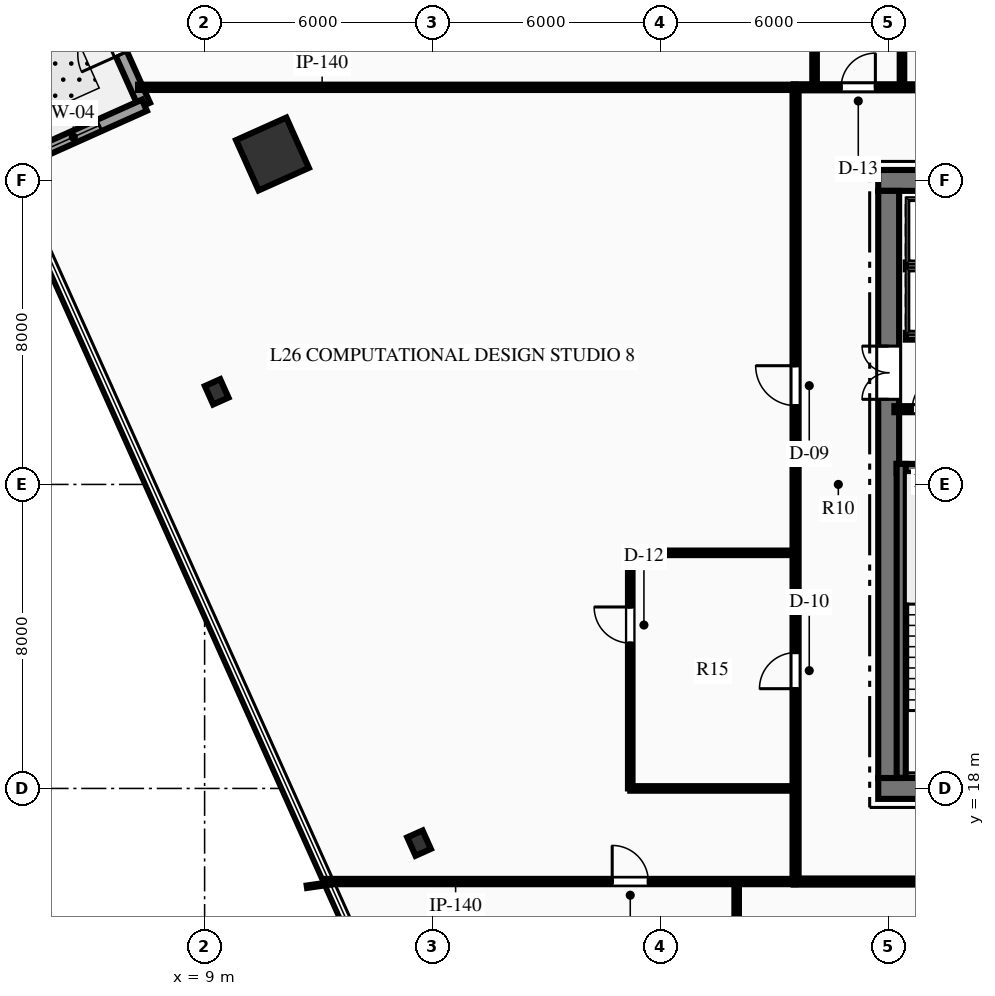
"""IFC4 building model, lengths in metres.
Left out: names, types, materials, properties, quantities, classifications, styles, units other than length and angle.
Written with IfcOpenShell. Run it as: python <this file> out.ifc"""

import sys

from ifc_helpers import new_model, si_unit, direction, frame, frame_2d, origin, origin_2d, place, context, subcontext, project, spatial, rectangle, hollow_rectangle, i_section, extrude, element, fill, save


model = new_model("IFC4")
c1 = context("Model", 3, precision=1e-05, world=origin(), true_north=direction((0.0, 1.0)))
c2 = subcontext(c1, "Body", "Model", "MODEL_VIEW")
j1 = project(units=[si_unit("LENGTHUNIT", "METRE"), si_unit("PLANEANGLEUNIT", "RADIAN")], contexts=[c1])
p1 = place(None, origin())
s1 = spatial("IfcSite", under=j1, at=p1, CompositionType="ELEMENT")
p2 = place(p1, origin())
s2 = spatial("IfcBuilding", under=s1, at=p2, CompositionType="ELEMENT")
p3 = place(p2, frame((0.0, 0.0, 109.2)))
s3 = spatial("IfcBuildingStorey", under=s2, at=p3, CompositionType="ELEMENT", Elevation=109.2)
p4 = place(p3, frame((26.725, 18.0, 0.0), z_axis=(0.0, 0.0, 1.0), x_axis=(1.0, 0.0, 0.0)))
e1 = element("IfcWall", 1, at=p4, inside=s3, PredefinedType="SHEAR", context=c2, shape_type="SweptSolid", body=[
    extrude(rectangle(XDim=18.55, YDim=0.55, at=frame_2d((9.275, 0.0))), origin(), (0.0, 0.0, 1.0), 3.75),
])
p5 = place(p4, frame((7.375, 0.0, 0.0)))
e2 = element("IfcOpeningElement", 2, at=p5, cuts=e1, PredefinedType="OPENING", context=c2, shape_type="SweptSolid", body=[
    extrude(rectangle(XDim=1.1, YDim=2.15, at=frame_2d((0.55, 1.075))), frame((0.0, 0.285, 0.0), z_axis=(0.0, -1.0, 0.0), x_axis=(1.0, 0.0, 0.0)), (0.0, 0.0, 1.0), 0.57),
])
p6 = place(p4, frame((10.075, 0.0, 0.0)))
e3 = element("IfcOpeningElement", 3, at=p6, cuts=e1, PredefinedType="OPENING", context=c2, shape_type="SweptSolid", body=[
    extrude(rectangle(XDim=1.1, YDim=2.15, at=frame_2d((0.55, 1.075))), frame((0.0, 0.285, 0.0), z_axis=(0.0, -1.0, 0.0), x_axis=(1.0, 0.0, 0.0)), (0.0, 0.0, 1.0), 0.57),
])
p7 = place(p3, frame((26.725, 34.0, 0.0), z_axis=(0.0, 0.0, 1.0), x_axis=(1.0, 0.0, 0.0)))
e4 = element("IfcWall", 4, at=p7, inside=s3, PredefinedType="SHEAR", context=c2, shape_type="SweptSolid", body=[
    extrude(rectangle(XDim=18.55, YDim=0.55, at=frame_2d((9.275, 0.0))), origin(), (0.0, 0.0, 1.0), 3.75),
])
p8 = place(p7, frame((1.24, 0.0, 0.0)))
e5 = element("IfcOpeningElement", 5, at=p8, cuts=e4, PredefinedType="OPENING", context=c2, shape_type="SweptSolid", body=[
    extrude(rectangle(XDim=1.1, YDim=2.15, at=frame_2d((0.55, 1.075))), frame((0.0, 0.285, 0.0), z_axis=(0.0, -1.0, 0.0), x_axis=(1.0, 0.0, 0.0)), (0.0, 0.0, 1.0), 0.57),
])
p9 = place(p7, frame((3.49, 0.0, 0.0)))
e6 = element("IfcOpeningElement", 6, at=p9, cuts=e4, PredefinedType="OPENING", context=c2, shape_type="SweptSolid", body=[
    extrude(rectangle(XDim=1.1, YDim=2.15, at=frame_2d((0.55, 1.075))), frame((0.0, 0.285, 0.0), z_axis=(0.0, -1.0, 0.0), x_axis=(1.0, 0.0, 0.0)), (0.0, 0.0, 1.0), 0.57),
])
p10 = place(p7, frame((13.96, 0.0, 0.0)))
e7 = element("IfcOpeningElement", 7, at=p10, cuts=e4, PredefinedType="OPENING", context=c2, shape_type="SweptSolid", body=[
    extrude(rectangle(XDim=1.1, YDim=2.15, at=frame_2d((0.55, 1.075))), frame((0.0, 0.285, 0.0), z_axis=(0.0, -1.0, 0.0), x_axis=(1.0, 0.0, 0.0)), (0.0, 0.0, 1.0), 0.57),
])
p11 = place(p7, frame((16.21, 0.0, 0.0)))
e8 = element("IfcOpeningElement", 8, at=p11, cuts=e4, PredefinedType="OPENING", context=c2, shape_type="SweptSolid", body=[
    extrude(rectangle(XDim=1.1, YDim=2.15, at=frame_2d((0.55, 1.075))), frame((0.0, 0.285, 0.0), z_axis=(0.0, -1.0, 0.0), x_axis=(1.0, 0.0, 0.0)), (0.0, 0.0, 1.0), 0.57),
])
p12 = place(p3, frame((27.0, 18.275, 0.0), z_axis=(0.0, 0.0, 1.0), x_axis=(0.0, 1.0, 0.0)))
e9 = element("IfcWall", 9, at=p12, inside=s3, PredefinedType="SHEAR", context=c2, shape_type="SweptSolid", body=[
    extrude(rectangle(XDim=15.45, YDim=0.55, at=frame_2d((7.725, 0.0))), origin(), (0.0, 0.0, 1.0), 3.75),
])
p13 = place(p12, frame((9.965, 0.0, 0.0)))
e10 = element("IfcOpeningElement", 10, at=p13, cuts=e9, PredefinedType="OPENING", context=c2, shape_type="SweptSolid", body=[
    extrude(rectangle(XDim=1.4, YDim=2.2, at=frame_2d((0.7, 1.1))), frame((0.0, 0.285, 0.0), z_axis=(0.0, -1.0, 0.0), x_axis=(1.0, 0.0, 0.0)), (0.0, 0.0, 1.0), 0.57),
])
p14 = place(p3, frame((27.21, 26.42, 0.0), z_axis=(0.0, 0.0, 1.0), x_axis=(1.0, 0.0, 0.0)))
e11 = element("IfcWall", 11, at=p14, inside=s3, PredefinedType="SHEAR", context=c2, shape_type="SweptSolid", body=[
    extrude(rectangle(XDim=3.98, YDim=0.24, at=frame_2d((1.99, 0.0))), origin(), (0.0, 0.0, 1.0), 3.75),
])
p15 = place(p3, frame((27.33, 18.28, 0.0), z_axis=(0.0, 0.0, 1.0), x_axis=(0.0, 1.0, 0.0)))
e12 = element("IfcWall", 12, at=p15, inside=s3, PredefinedType="SHEAR", context=c2, shape_type="SweptSolid", body=[
    extrude(rectangle(XDim=8.26, YDim=0.24, at=frame_2d((4.13, 0.0))), origin(), (0.0, 0.0, 1.0), 3.75),
])
p16 = place(p3, frame((10.786, 34.695, 0.0), z_axis=(0.0, 0.0, 1.0), x_axis=(0.912477494148, 0.409126902895, 0.0)))
e13 = element("IfcColumn", 13, at=p16, inside=s3, PredefinedType="COLUMN", context=c2, shape_type="SweptSolid", body=[
    extrude(hollow_rectangle(XDim=1.45, YDim=1.45, WallThickness=0.07, at=origin_2d()), origin(), (0.0, 0.0, 1.0), 3.75),
])
for number, where, z_axis, x_axis in (
    (14, (9.318, 28.437, 0.0), (0.0, 0.0, 1.0), (0.912, 0.409, 0.0)),
    (15, (14.643, 16.561, 0.0), (0.0, 0.0, 1.0), (0.912, 0.409, 0.0)),
):
    element("IfcColumn", number, at=place(p3, frame(where, z_axis=z_axis, x_axis=x_axis)), inside=s3, PredefinedType="COLUMN", context=c2, shape_type="SweptSolid", body=[
        extrude(i_section(OverallWidth=0.442, OverallDepth=0.531, WebThickness=0.066, FlangeThickness=0.106, at=origin_2d()), origin(), (0.0, 0.0, 1.0), 3.75),
    ])
p17 = place(p3, frame((7.416, 35.979, 0.0), z_axis=(0.0, 0.0, 1.0), x_axis=(-0.409136259283, 0.912473298974, 0.0)))
e16 = element("IfcWall", 16, at=p17, inside=s3, PredefinedType="STANDARD", context=c2, shape_type="SweptSolid", body=[
    extrude(rectangle(XDim=4.1, YDim=0.32, at=frame_2d((2.05, 0.0))), origin(), (0.0, 0.0, 1.0), 3.45),
])
p18 = place(p17, frame((1.475, 0.0, 0.0)))
e17 = element("IfcOpeningElement", 17, at=p18, cuts=e16, PredefinedType="OPENING", context=c2, shape_type="SweptSolid", body=[
    extrude(rectangle(XDim=1.15, YDim=2.2, at=frame_2d((0.575, 1.1))), frame((0.0, 0.17, 0.0), z_axis=(0.0, -1.0, 0.0), x_axis=(1.0, 0.0, 0.0)), (0.0, 0.0, 1.0), 0.34),
])
p19 = place(p3, frame((3.675, 34.301, 0.0), z_axis=(0.0, 0.0, 1.0), x_axis=(0.912473298974, 0.409136259283, 0.0)))
e18 = element("IfcWall", 18, at=p19, inside=s3, PredefinedType="STANDARD", context=c2, shape_type="SweptSolid", body=[
    extrude(rectangle(XDim=4.1, YDim=0.32, at=frame_2d((2.05, 0.0))), origin(), (0.0, 0.0, 1.0), 3.45),
])
p20 = place(p19, frame((1.3, 0.0, 0.85)))
e19 = element("IfcOpeningElement", 19, at=p20, cuts=e18, PredefinedType="OPENING", context=c2, shape_type="SweptSolid", body=[
    extrude(rectangle(XDim=1.5, YDim=2.1, at=frame_2d((0.75, 1.05))), frame((0.0, 0.17, 0.0), z_axis=(0.0, -1.0, 0.0), x_axis=(1.0, 0.0, 0.0)), (0.0, 0.0, 1.0), 0.34),
])
p21 = place(p3, frame((27.15, 27.98, 0.0), z_axis=(0.0, 0.0, 1.0), x_axis=(1.0, 0.0, 0.0)))
e20 = element("IfcWall", 20, at=p21, inside=s3, PredefinedType="PARTITIONING", context=c2, shape_type="SweptSolid", body=[
    extrude(rectangle(XDim=4.05, YDim=0.16, at=frame_2d((2.025, 0.0))), origin(), (0.0, 0.0, 1.0), 3.45),
])
p22 = place(p21, frame((0.47, 0.0, 0.0)))
e21 = element("IfcOpeningElement", 21, at=p22, cuts=e20, PredefinedType="OPENING", context=c2, shape_type="SweptSolid", body=[
    extrude(rectangle(XDim=0.9, YDim=2.15, at=frame_2d((0.45, 1.075))), frame((0.0, 0.09, 0.0), z_axis=(0.0, -1.0, 0.0), x_axis=(1.0, 0.0, 0.0)), (0.0, 0.0, 1.0), 0.18),
])
p23 = place(p21, frame((2.36, 0.0, 0.0)))
e22 = element("IfcOpeningElement", 22, at=p23, cuts=e20, PredefinedType="OPENING", context=c2, shape_type="SweptSolid", body=[
    extrude(rectangle(XDim=0.9, YDim=2.15, at=frame_2d((0.45, 1.075))), frame((0.0, 0.09, 0.0), z_axis=(0.0, -1.0, 0.0), x_axis=(1.0, 0.0, 0.0)), (0.0, 0.0, 1.0), 0.18),
])
p24 = place(p3, frame((27.45, 29.9, 0.0), z_axis=(0.0, 0.0, 1.0), x_axis=(1.0, 0.0, 0.0)))
e23 = element("IfcWall", 23, at=p24, inside=s3, PredefinedType="PARTITIONING", context=c2, shape_type="SweptSolid", body=[
    extrude(rectangle(XDim=4.43, YDim=0.18, at=frame_2d((2.215, 0.0))), origin(), (0.0, 0.0, 1.0), 3.45),
])
p25 = place(p24, frame((0.515, 0.0, 0.0)))
e24 = element("IfcOpeningElement", 24, at=p25, cuts=e23, PredefinedType="OPENING", context=c2, shape_type="SweptSolid", body=[
    extrude(rectangle(XDim=1.1, YDim=2.15, at=frame_2d((0.55, 1.075))), frame((0.0, 0.1, 0.0), z_axis=(0.0, -1.0, 0.0), x_axis=(1.0, 0.0, 0.0)), (0.0, 0.0, 1.0), 0.2),
])
p26 = place(p24, frame((2.765, 0.0, 0.0)))
e25 = element("IfcOpeningElement", 25, at=p26, cuts=e23, PredefinedType="OPENING", context=c2, shape_type="SweptSolid", body=[
    extrude(rectangle(XDim=1.1, YDim=2.15, at=frame_2d((0.55, 1.075))), frame((0.0, 0.1, 0.0), z_axis=(0.0, -1.0, 0.0), x_axis=(1.0, 0.0, 0.0)), (0.0, 0.0, 1.0), 0.2),
])
p27 = place(p3, frame((27.45, 31.75, 0.0), z_axis=(0.0, 0.0, 1.0), x_axis=(1.0, 0.0, 0.0)))
e26 = element("IfcWall", 26, at=p27, inside=s3, PredefinedType="PARTITIONING", context=c2, shape_type="SweptSolid", body=[
    extrude(rectangle(XDim=4.43, YDim=0.18, at=frame_2d((2.215, 0.0))), origin(), (0.0, 0.0, 1.0), 3.45),
])
p28 = place(p3, frame((24.5, 15.55, 0.0), z_axis=(0.0, 0.0, 1.0), x_axis=(1.0, 0.0, 0.0)))
e27 = element("IfcWall", 27, at=p28, inside=s3, PredefinedType="PARTITIONING", context=c2, shape_type="SweptSolid", body=[
    extrude(rectangle(XDim=23.0, YDim=0.16, at=frame_2d((11.5, 0.0))), origin(), (0.0, 0.0, 1.0), 3.45),
])
p29 = place(p28, frame((4.121, 0.0, 0.0)))
e28 = element("IfcOpeningElement", 28, at=p29, cuts=e27, PredefinedType="OPENING", context=c2, shape_type="SweptSolid", body=[
    extrude(rectangle(XDim=1.05, YDim=2.15, at=frame_2d((0.525, 1.075))), frame((0.0, 0.09, 0.0), z_axis=(0.0, -1.0, 0.0), x_axis=(1.0, 0.0, 0.0)), (0.0, 0.0, 1.0), 0.18),
])
p30 = place(p28, frame((9.535, 0.0, 0.0)))
e29 = element("IfcOpeningElement", 29, at=p30, cuts=e27, PredefinedType="OPENING", context=c2, shape_type="SweptSolid", body=[
    extrude(rectangle(XDim=1.05, YDim=2.15, at=frame_2d((0.525, 1.075))), frame((0.0, 0.09, 0.0), z_axis=(0.0, -1.0, 0.0), x_axis=(1.0, 0.0, 0.0)), (0.0, 0.0, 1.0), 0.18),
])
p31 = place(p28, frame((18.849, 0.0, 0.0)))
e30 = element("IfcOpeningElement", 30, at=p31, cuts=e27, PredefinedType="OPENING", context=c2, shape_type="SweptSolid", body=[
    extrude(rectangle(XDim=1.05, YDim=2.15, at=frame_2d((0.525, 1.075))), frame((0.0, 0.09, 0.0), z_axis=(0.0, -1.0, 0.0), x_axis=(1.0, 0.0, 0.0)), (0.0, 0.0, 1.0), 0.18),
])
p32 = place(p3, frame((24.5, 36.45, 0.0), z_axis=(0.0, 0.0, 1.0), x_axis=(1.0, 0.0, 0.0)))
e31 = element("IfcWall", 31, at=p32, inside=s3, PredefinedType="PARTITIONING", context=c2, shape_type="SweptSolid", body=[
    extrude(rectangle(XDim=23.0, YDim=0.16, at=frame_2d((11.5, 0.0))), origin(), (0.0, 0.0, 1.0), 3.45),
])
p33 = place(p32, frame((1.25, 0.0, 0.0)))
e32 = element("IfcOpeningElement", 32, at=p33, cuts=e31, PredefinedType="OPENING", context=c2, shape_type="SweptSolid", body=[
    extrude(rectangle(XDim=0.9, YDim=2.15, at=frame_2d((0.45, 1.075))), frame((0.0, 0.09, 0.0), z_axis=(0.0, -1.0, 0.0), x_axis=(1.0, 0.0, 0.0)), (0.0, 0.0, 1.0), 0.18),
])
p34 = place(p32, frame((3.55, 0.0, 0.0)))
e33 = element("IfcOpeningElement", 33, at=p34, cuts=e31, PredefinedType="OPENING", context=c2, shape_type="SweptSolid", body=[
    extrude(rectangle(XDim=0.9, YDim=2.15, at=frame_2d((0.45, 1.075))), frame((0.0, 0.09, 0.0), z_axis=(0.0, -1.0, 0.0), x_axis=(1.0, 0.0, 0.0)), (0.0, 0.0, 1.0), 0.18),
])
p35 = place(p32, frame((5.8, 0.0, 0.0)))
e34 = element("IfcOpeningElement", 34, at=p35, cuts=e31, PredefinedType="OPENING", context=c2, shape_type="SweptSolid", body=[
    extrude(rectangle(XDim=1.0, YDim=2.15, at=frame_2d((0.5, 1.075))), frame((0.0, 0.09, 0.0), z_axis=(0.0, -1.0, 0.0), x_axis=(1.0, 0.0, 0.0)), (0.0, 0.0, 1.0), 0.18),
])
p36 = place(p32, frame((13.545, 0.0, 0.0)))
e35 = element("IfcOpeningElement", 35, at=p36, cuts=e31, PredefinedType="OPENING", context=c2, shape_type="SweptSolid", body=[
    extrude(rectangle(XDim=1.05, YDim=2.15, at=frame_2d((0.525, 1.075))), frame((0.0, 0.09, 0.0), z_axis=(0.0, -1.0, 0.0), x_axis=(1.0, 0.0, 0.0)), (0.0, 0.0, 1.0), 0.18),
])
p37 = place(p32, frame((18.169, 0.0, 0.0)))
e36 = element("IfcOpeningElement", 36, at=p37, cuts=e31, PredefinedType="OPENING", context=c2, shape_type="SweptSolid", body=[
    extrude(rectangle(XDim=1.05, YDim=2.15, at=frame_2d((0.525, 1.075))), frame((0.0, 0.09, 0.0), z_axis=(0.0, -1.0, 0.0), x_axis=(1.0, 0.0, 0.0)), (0.0, 0.0, 1.0), 0.18),
])
p38 = place(p3, frame((24.55, 15.55, 0.0), z_axis=(0.0, 0.0, 1.0), x_axis=(0.0, 1.0, 0.0)))
e37 = element("IfcWall", 37, at=p38, inside=s3, PredefinedType="PARTITIONING", context=c2, shape_type="SweptSolid", body=[
    extrude(rectangle(XDim=20.9, YDim=0.16, at=frame_2d((10.45, 0.0))), origin(), (0.0, 0.0, 1.0), 3.45),
])
p39 = place(p38, frame((5.075, 0.0, 0.0)))
e38 = element("IfcOpeningElement", 38, at=p39, cuts=e37, PredefinedType="OPENING", context=c2, shape_type="SweptSolid", body=[
    extrude(rectangle(XDim=0.95, YDim=2.15, at=frame_2d((0.475, 1.075))), frame((0.0, 0.09, 0.0), z_axis=(0.0, -1.0, 0.0), x_axis=(1.0, 0.0, 0.0)), (0.0, 0.0, 1.0), 0.18),
])
p40 = place(p38, frame((12.524, 0.0, 0.0)))
e39 = element("IfcOpeningElement", 39, at=p40, cuts=e37, PredefinedType="OPENING", context=c2, shape_type="SweptSolid", body=[
    extrude(rectangle(XDim=1.05, YDim=2.15, at=frame_2d((0.525, 1.075))), frame((0.0, 0.09, 0.0), z_axis=(0.0, -1.0, 0.0), x_axis=(1.0, 0.0, 0.0)), (0.0, 0.0, 1.0), 0.18),
])
p41 = place(p3, frame((25.05, 36.45, 0.0), z_axis=(0.0, 0.0, 1.0), x_axis=(0.0, 1.0, 0.0)))
e40 = element("IfcWall", 40, at=p41, inside=s3, PredefinedType="PARTITIONING", context=c2, shape_type="SweptSolid", body=[
    extrude(rectangle(XDim=3.9, YDim=0.12, at=frame_2d((1.95, 0.0))), origin(), (0.0, 0.0, 1.0), 3.45),
])
p42 = place(p3, frame((27.35, 36.45, 0.0), z_axis=(0.0, 0.0, 1.0), x_axis=(0.0, 1.0, 0.0)))
e41 = element("IfcWall", 41, at=p42, inside=s3, PredefinedType="PARTITIONING", context=c2, shape_type="SweptSolid", body=[
    extrude(rectangle(XDim=3.9, YDim=0.12, at=frame_2d((1.95, 0.0))), origin(), (0.0, 0.0, 1.0), 2.749),
])
p43 = place(p3, frame((12.126, 15.55, 0.0), z_axis=(0.0, 0.0, 1.0), x_axis=(1.0, 0.0, 0.0)))
e42 = element("IfcWall", 42, at=p43, inside=s3, PredefinedType="PARTITIONING", context=c2, shape_type="SweptSolid", body=[
    extrude(rectangle(XDim=12.424, YDim=0.14, at=frame_2d((6.212, 0.0))), origin(), (0.0, 0.0, 1.0), 3.45),
])
p44 = place(p43, frame((7.599, 0.0, 0.0)))
e43 = element("IfcOpeningElement", 43, at=p44, cuts=e42, PredefinedType="OPENING", context=c2, shape_type="SweptSolid", body=[
    extrude(rectangle(XDim=0.95, YDim=2.15, at=frame_2d((0.475, 1.075))), frame((0.0, 0.08, 0.0), z_axis=(0.0, -1.0, 0.0), x_axis=(1.0, 0.0, 0.0)), (0.0, 0.0, 1.0), 0.16),
])
p45 = place(p3, frame((7.248, 36.45, 0.0), z_axis=(0.0, 0.0, 1.0), x_axis=(1.0, 0.0, 0.0)))
e44 = element("IfcWall", 44, at=p45, inside=s3, PredefinedType="PARTITIONING", context=c2, shape_type="SweptSolid", body=[
    extrude(rectangle(XDim=17.302, YDim=0.14, at=frame_2d((8.651, 0.0))), origin(), (0.0, 0.0, 1.0), 3.45),
])
p46 = place(p3, frame((23.0, -2.142, 0.0), z_axis=(0.0, 0.0, 1.0), x_axis=(0.0, 1.0, 0.0)))
e45 = element("IfcWall", 45, at=p46, inside=s3, PredefinedType="PARTITIONING", context=c2, shape_type="SweptSolid", body=[
    extrude(rectangle(XDim=17.692, YDim=0.12, at=frame_2d((8.846, 0.0))), origin(), (0.0, 0.0, 1.0), 3.45),
])
p47 = place(p3, frame((20.2, 18.0, 0.0), z_axis=(0.0, 0.0, 1.0), x_axis=(1.0, 0.0, 0.0)))
e46 = element("IfcWall", 46, at=p47, inside=s3, PredefinedType="PARTITIONING", context=c2, shape_type="SweptSolid", body=[
    extrude(rectangle(XDim=4.35, YDim=0.12, at=frame_2d((2.175, 0.0))), origin(), (0.0, 0.0, 1.0), 2.749),
])
p48 = place(p3, frame((20.2, 18.0, 0.0), z_axis=(0.0, 0.0, 1.0), x_axis=(0.0, 1.0, 0.0)))
e47 = element("IfcWall", 47, at=p48, inside=s3, PredefinedType="PARTITIONING", context=c2, shape_type="SweptSolid", body=[
    extrude(rectangle(XDim=6.2, YDim=0.12, at=frame_2d((3.1, 0.0))), origin(), (0.0, 0.0, 1.0), 3.45),
])
p49 = place(p48, frame((3.825, 0.0, 0.0)))
e48 = element("IfcOpeningElement", 48, at=p49, cuts=e47, PredefinedType="OPENING", context=c2, shape_type="SweptSolid", body=[
    extrude(rectangle(XDim=0.95, YDim=2.15, at=frame_2d((0.475, 1.075))), frame((0.0, 0.07, 0.0), z_axis=(0.0, -1.0, 0.0), x_axis=(1.0, 0.0, 0.0)), (0.0, 0.0, 1.0), 0.14),
])
p50 = place(p3, frame((20.2, 24.2, 0.0), z_axis=(0.0, 0.0, 1.0), x_axis=(1.0, 0.0, 0.0)))
e49 = element("IfcWall", 49, at=p50, inside=s3, PredefinedType="PARTITIONING", context=c2, shape_type="SweptSolid", body=[
    extrude(rectangle(XDim=4.35, YDim=0.12, at=frame_2d((2.175, 0.0))), origin(), (0.0, 0.0, 1.0), 3.45),
])
p51 = place(p18, origin())
e50 = element("IfcDoor", 50, at=p51, inside=s3, OperationType="SINGLE_SWING_LEFT", PredefinedType="DOOR", context=c2, shape_type="SweptSolid", body=[
    extrude(rectangle(XDim=1.15, YDim=2.2, at=frame_2d((0.575, 1.1))), frame((0.0, 0.025, 0.0), z_axis=(0.0, -1.0, 0.0), x_axis=(1.0, 0.0, 0.0)), (0.0, 0.0, 1.0), 0.05),
])
fill(e17, e50)
p52 = place(p20, origin())
e51 = element("IfcWindow", 51, at=p52, inside=s3, PartitioningType="SINGLE_PANEL", PredefinedType="WINDOW", context=c2, shape_type="SweptSolid", body=[
    extrude(rectangle(XDim=1.5, YDim=2.1, at=frame_2d((0.75, 1.05))), frame((0.0, 0.03, 0.0), z_axis=(0.0, -1.0, 0.0), x_axis=(1.0, 0.0, 0.0)), (0.0, 0.0, 1.0), 0.06),
])
fill(e19, e51)
p53 = place(p22, origin())
e52 = element("IfcDoor", 52, at=p53, inside=s3, OperationType="SINGLE_SWING_RIGHT", PredefinedType="DOOR", context=c2, shape_type="SweptSolid", body=[
    extrude(rectangle(XDim=0.9, YDim=2.15, at=frame_2d((0.45, 1.075))), frame((0.0, 0.025, 0.0), z_axis=(0.0, -1.0, 0.0), x_axis=(1.0, 0.0, 0.0)), (0.0, 0.0, 1.0), 0.05),
])
fill(e21, e52)
p54 = place(p13, origin())
e53 = element("IfcDoor", 53, at=p54, inside=s3, OperationType="DOUBLE_DOOR_SINGLE_SWING", PredefinedType="DOOR", context=c2, shape_type="SweptSolid", body=[
    extrude(rectangle(XDim=1.4, YDim=2.2, at=frame_2d((0.7, 1.1))), frame((0.0, 0.025, 0.0), z_axis=(0.0, -1.0, 0.0), x_axis=(1.0, 0.0, 0.0)), (0.0, 0.0, 1.0), 0.05),
])
fill(e10, e53)
p55 = place(p33, origin())
e54 = element("IfcDoor", 54, at=p55, inside=s3, OperationType="SINGLE_SWING_RIGHT", PredefinedType="DOOR", context=c2, shape_type="SweptSolid", body=[
    extrude(rectangle(XDim=0.9, YDim=2.15, at=frame_2d((0.45, 1.075))), frame((0.0, 0.025, 0.0), z_axis=(0.0, -1.0, 0.0), x_axis=(1.0, 0.0, 0.0)), (0.0, 0.0, 1.0), 0.05),
])
fill(e32, e54)
p56 = place(p39, origin())
e55 = element("IfcDoor", 55, at=p56, inside=s3, OperationType="SINGLE_SWING_LEFT", PredefinedType="DOOR", context=c2, shape_type="SweptSolid", body=[
    extrude(rectangle(XDim=0.95, YDim=2.15, at=frame_2d((0.475, 1.075))), frame((0.0, 0.025, 0.0), z_axis=(0.0, -1.0, 0.0), x_axis=(1.0, 0.0, 0.0)), (0.0, 0.0, 1.0), 0.05),
])
fill(e38, e55)
p57 = place(p49, origin())
e56 = element("IfcDoor", 56, at=p57, inside=s3, OperationType="SINGLE_SWING_RIGHT", PredefinedType="DOOR", context=c2, shape_type="SweptSolid", body=[
    extrude(rectangle(XDim=0.95, YDim=2.15, at=frame_2d((0.475, 1.075))), frame((0.0, 0.025, 0.0), z_axis=(0.0, -1.0, 0.0), x_axis=(1.0, 0.0, 0.0)), (0.0, 0.0, 1.0), 0.05),
])
fill(e48, e56)
p58 = place(p44, origin())
e57 = element("IfcDoor", 57, at=p58, inside=s3, OperationType="SINGLE_SWING_LEFT", PredefinedType="DOOR", context=c2, shape_type="SweptSolid", body=[
    extrude(rectangle(XDim=0.95, YDim=2.15, at=frame_2d((0.475, 1.075))), frame((0.0, 0.025, 0.0), z_axis=(0.0, -1.0, 0.0), x_axis=(1.0, 0.0, 0.0)), (0.0, 0.0, 1.0), 0.05),
])
fill(e43, e57)
p59 = place(p40, origin())
e58 = element("IfcDoor", 58, at=p59, inside=s3, OperationType="SINGLE_SWING_RIGHT", PredefinedType="DOOR", context=c2, shape_type="SweptSolid", body=[
    extrude(rectangle(XDim=1.05, YDim=2.15, at=frame_2d((0.525, 1.075))), frame((0.0, 0.025, 0.0), z_axis=(0.0, -1.0, 0.0), x_axis=(1.0, 0.0, 0.0)), (0.0, 0.0, 1.0), 0.05),
])
fill(e39, e58)
save(model, sys.argv[1])
